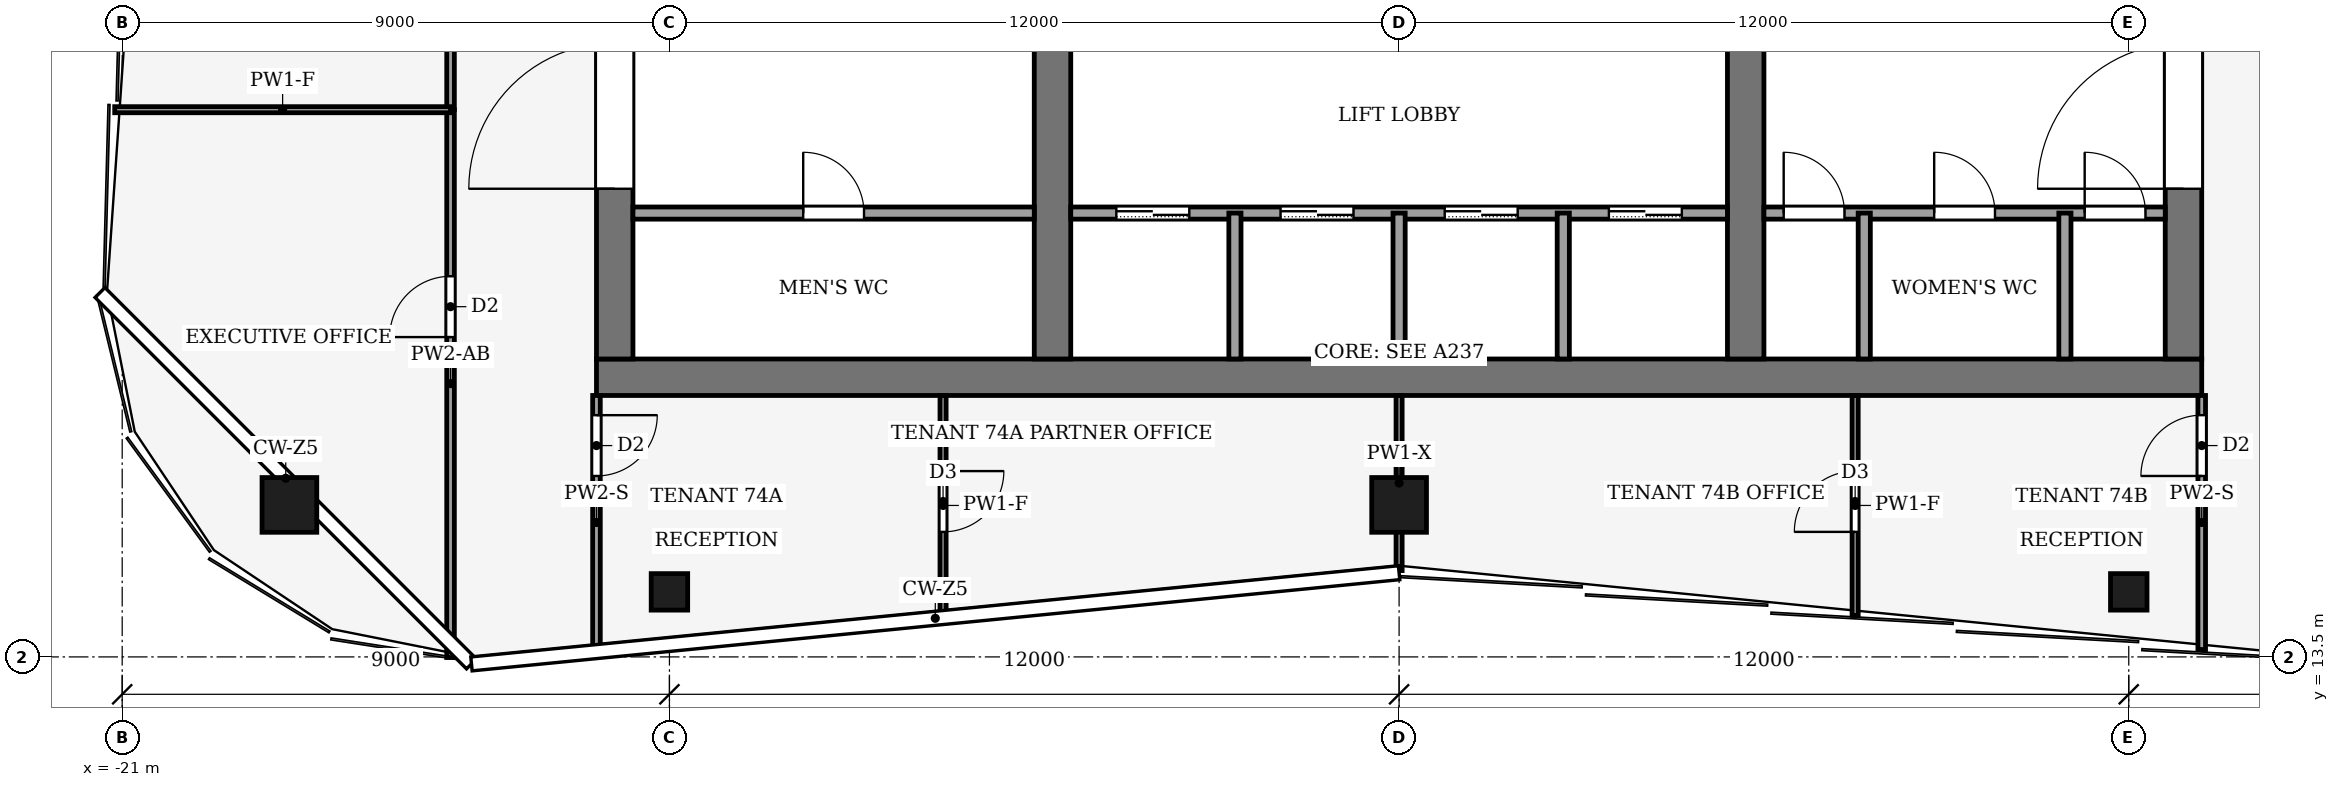
"""IFC4 building model, lengths in metres.
Left out: names, types, materials, properties, quantities, classifications, styles, units other than length and angle.
Written with IfcOpenShell. Run it as: python <this file> out.ifc"""

import sys

from ifc_helpers import new_model, si_unit, direction, frame, frame_2d, origin, origin_2d, place, context, subcontext, project, spatial, rectangle, hollow_rectangle, extrude, element, fill, save


model = new_model("IFC4")
c1 = context("Model", 3, precision=1e-05, world=origin(), true_north=direction((0.0, 1.0)))
c2 = subcontext(c1, "Body", "Model", "MODEL_VIEW")
j1 = project(units=[si_unit("LENGTHUNIT", "METRE"), si_unit("PLANEANGLEUNIT", "RADIAN")], contexts=[c1])
p1 = place(None, origin())
s1 = spatial("IfcSite", under=j1, at=p1, CompositionType="ELEMENT")
p2 = place(p1, origin())
s2 = spatial("IfcBuilding", under=s1, at=p2, CompositionType="ELEMENT")
p3 = place(p2, frame((0.0, 0.0, 322.0)))
s3 = spatial("IfcBuildingStorey", under=s2, at=p3, CompositionType="ELEMENT", Elevation=322.0)
p4 = place(p3, frame((-13.2, 18.1, -0.13), z_axis=(0.0, 0.0, 1.0), x_axis=(1.0, 0.0, 0.0)))
e1 = element("IfcWall", 1, at=p4, inside=s3, PredefinedType="SHEAR", context=c2, shape_type="SweptSolid", body=[
    extrude(rectangle(XDim=26.4, YDim=0.6, at=frame_2d((13.2, 0.0))), origin(), (0.0, 0.0, 1.0), 4.0),
])
p5 = place(p3, frame((-12.9, 18.4, -0.13), z_axis=(0.0, 0.0, 1.0), x_axis=(0.0, 1.0, 0.0)))
e2 = element("IfcWall", 2, at=p5, inside=s3, PredefinedType="SHEAR", context=c2, shape_type="SweptSolid", body=[
    extrude(rectangle(XDim=19.2, YDim=0.6, at=frame_2d((9.6, 0.0))), origin(), (0.0, 0.0, 1.0), 4.0),
])
p6 = place(p5, frame((2.8, 0.0, 0.13)))
e3 = element("IfcOpeningElement", 3, at=p6, cuts=e2, PredefinedType="OPENING", context=c2, shape_type="SweptSolid", body=[
    extrude(rectangle(XDim=2.4, YDim=2.4, at=frame_2d((1.2, 1.2))), frame((0.0, 0.31, 0.0), z_axis=(0.0, -1.0, 0.0), x_axis=(1.0, 0.0, 0.0)), (0.0, 0.0, 1.0), 0.62),
])
p7 = place(p5, frame((13.4, 0.0, 0.13)))
e4 = element("IfcOpeningElement", 4, at=p7, cuts=e2, PredefinedType="OPENING", context=c2, shape_type="SweptSolid", body=[
    extrude(rectangle(XDim=1.4, YDim=2.2, at=frame_2d((0.7, 1.1))), frame((0.0, 0.31, 0.0), z_axis=(0.0, -1.0, 0.0), x_axis=(1.0, 0.0, 0.0)), (0.0, 0.0, 1.0), 0.62),
])
p8 = place(p3, frame((12.9, 18.4, -0.13), z_axis=(0.0, 0.0, 1.0), x_axis=(0.0, 1.0, 0.0)))
e5 = element("IfcWall", 5, at=p8, inside=s3, PredefinedType="SHEAR", context=c2, shape_type="SweptSolid", body=[
    extrude(rectangle(XDim=19.2, YDim=0.6, at=frame_2d((9.6, 0.0))), origin(), (0.0, 0.0, 1.0), 4.0),
])
p9 = place(p8, frame((2.8, 0.0, 0.13)))
e6 = element("IfcOpeningElement", 6, at=p9, cuts=e5, PredefinedType="OPENING", context=c2, shape_type="SweptSolid", body=[
    extrude(rectangle(XDim=2.4, YDim=2.4, at=frame_2d((1.2, 1.2))), frame((0.0, 0.31, 0.0), z_axis=(0.0, -1.0, 0.0), x_axis=(1.0, 0.0, 0.0)), (0.0, 0.0, 1.0), 0.62),
])
p10 = place(p8, frame((13.3, 0.0, 0.13)))
e7 = element("IfcOpeningElement", 7, at=p10, cuts=e5, PredefinedType="OPENING", context=c2, shape_type="SweptSolid", body=[
    extrude(rectangle(XDim=2.4, YDim=2.4, at=frame_2d((1.2, 1.2))), frame((0.0, 0.31, 0.0), z_axis=(0.0, -1.0, 0.0), x_axis=(1.0, 0.0, 0.0)), (0.0, 0.0, 1.0), 0.62),
])
p11 = place(p3, frame((-5.7, 18.4, -0.13), z_axis=(0.0, 0.0, 1.0), x_axis=(0.0, 1.0, 0.0)))
e8 = element("IfcWall", 8, at=p11, inside=s3, PredefinedType="SHEAR", context=c2, shape_type="SweptSolid", body=[
    extrude(rectangle(XDim=19.2, YDim=0.6, at=frame_2d((9.6, 0.0))), origin(), (0.0, 0.0, 1.0), 4.0),
])
p12 = place(p11, frame((8.35, 0.0, 0.13)))
e9 = element("IfcOpeningElement", 9, at=p12, cuts=e8, PredefinedType="OPENING", context=c2, shape_type="SweptSolid", body=[
    extrude(rectangle(XDim=0.9, YDim=2.1, at=frame_2d((0.45, 1.05))), frame((0.0, 0.31, 0.0), z_axis=(0.0, -1.0, 0.0), x_axis=(1.0, 0.0, 0.0)), (0.0, 0.0, 1.0), 0.62),
])
p13 = place(p3, frame((5.7, 18.4, -0.13), z_axis=(0.0, 0.0, 1.0), x_axis=(0.0, 1.0, 0.0)))
e10 = element("IfcWall", 10, at=p13, inside=s3, PredefinedType="SHEAR", context=c2, shape_type="SweptSolid", body=[
    extrude(rectangle(XDim=19.2, YDim=0.6, at=frame_2d((9.6, 0.0))), origin(), (0.0, 0.0, 1.0), 4.0),
])
p14 = place(p13, frame((13.3, 0.0, 0.13)))
e11 = element("IfcOpeningElement", 11, at=p14, cuts=e10, PredefinedType="OPENING", context=c2, shape_type="SweptSolid", body=[
    extrude(rectangle(XDim=2.4, YDim=2.4, at=frame_2d((1.2, 1.2))), frame((0.0, 0.31, 0.0), z_axis=(0.0, -1.0, 0.0), x_axis=(1.0, 0.0, 0.0)), (0.0, 0.0, 1.0), 0.62),
])
for number, where, z_axis, x_axis in (
    (12, (0.0, 16.0, 0.0), (0.0, 0.0, 1.0), (1.0, 0.0, 0.0)),
    (13, (-18.25, 16.0, 0.0), (0.0, 0.0, 1.0), (1.0, 0.0, 0.0)),
):
    element("IfcColumn", number, at=place(p3, frame(where, z_axis=z_axis, x_axis=x_axis)), inside=s3, PredefinedType="COLUMN", context=c2, shape_type="SweptSolid", body=[
        extrude(hollow_rectangle(XDim=0.9, YDim=0.9, WallThickness=0.04, at=origin_2d()), origin(), (0.0, 0.0, 1.0), 4.0),
    ])
for number, where, z_axis, x_axis in (
    (14, (-12.0, 14.57, 0.0), (0.0, 0.0, 1.0), (1.0, 0.0, 0.0)),
    (15, (12.0, 14.57, 0.0), (0.0, 0.0, 1.0), (1.0, 0.0, 0.0)),
):
    element("IfcColumn", number, at=place(p3, frame(where, z_axis=z_axis, x_axis=x_axis)), inside=s3, PredefinedType="COLUMN", context=c2, shape_type="SweptSolid", body=[
        extrude(hollow_rectangle(XDim=0.6, YDim=0.6, WallThickness=0.025, at=origin_2d()), origin(), (0.0, 0.0, 1.0), 4.0),
    ])
p15 = place(p3, frame((-12.6, 20.8, 0.0), z_axis=(0.0, 0.0, 1.0), x_axis=(1.0, 0.0, 0.0)))
e16 = element("IfcWall", 16, at=p15, inside=s3, PredefinedType="PARTITIONING", context=c2, shape_type="SweptSolid", body=[
    extrude(rectangle(XDim=6.6, YDim=0.2, at=frame_2d((3.3, 0.0))), origin(), (0.0, 0.0, 1.0), 3.87),
])
p16 = place(p15, frame((2.8, 0.0, 0.0)))
e17 = element("IfcOpeningElement", 17, at=p16, cuts=e16, PredefinedType="OPENING", context=c2, shape_type="SweptSolid", body=[
    extrude(rectangle(XDim=1.0, YDim=2.1, at=frame_2d((0.5, 1.05))), frame((0.0, 0.11, 0.0), z_axis=(0.0, -1.0, 0.0), x_axis=(1.0, 0.0, 0.0)), (0.0, 0.0, 1.0), 0.22),
])
p17 = place(p3, frame((-5.4, 20.8, 0.0), z_axis=(0.0, 0.0, 1.0), x_axis=(1.0, 0.0, 0.0)))
e18 = element("IfcWall", 18, at=p17, inside=s3, PredefinedType="PARTITIONING", context=c2, shape_type="SweptSolid", body=[
    extrude(rectangle(XDim=10.8, YDim=0.2, at=frame_2d((5.4, 0.0))), origin(), (0.0, 0.0, 1.0), 3.87),
])
p18 = place(p17, frame((0.75, 0.0, 0.0)))
e19 = element("IfcOpeningElement", 19, at=p18, cuts=e18, PredefinedType="OPENING", context=c2, shape_type="SweptSolid", body=[
    extrude(rectangle(XDim=1.2, YDim=2.2, at=frame_2d((0.6, 1.1))), frame((0.0, 0.11, 0.0), z_axis=(0.0, -1.0, 0.0), x_axis=(1.0, 0.0, 0.0)), (0.0, 0.0, 1.0), 0.22),
])
p19 = place(p17, frame((3.45, 0.0, 0.0)))
e20 = element("IfcOpeningElement", 20, at=p19, cuts=e18, PredefinedType="OPENING", context=c2, shape_type="SweptSolid", body=[
    extrude(rectangle(XDim=1.2, YDim=2.2, at=frame_2d((0.6, 1.1))), frame((0.0, 0.11, 0.0), z_axis=(0.0, -1.0, 0.0), x_axis=(1.0, 0.0, 0.0)), (0.0, 0.0, 1.0), 0.22),
])
p20 = place(p17, frame((6.15, 0.0, 0.0)))
e21 = element("IfcOpeningElement", 21, at=p20, cuts=e18, PredefinedType="OPENING", context=c2, shape_type="SweptSolid", body=[
    extrude(rectangle(XDim=1.2, YDim=2.2, at=frame_2d((0.6, 1.1))), frame((0.0, 0.11, 0.0), z_axis=(0.0, -1.0, 0.0), x_axis=(1.0, 0.0, 0.0)), (0.0, 0.0, 1.0), 0.22),
])
p21 = place(p17, frame((8.85, 0.0, 0.0)))
e22 = element("IfcOpeningElement", 22, at=p21, cuts=e18, PredefinedType="OPENING", context=c2, shape_type="SweptSolid", body=[
    extrude(rectangle(XDim=1.2, YDim=2.2, at=frame_2d((0.6, 1.1))), frame((0.0, 0.11, 0.0), z_axis=(0.0, -1.0, 0.0), x_axis=(1.0, 0.0, 0.0)), (0.0, 0.0, 1.0), 0.22),
])
p22 = place(p3, frame((6.0, 20.8, 0.0), z_axis=(0.0, 0.0, 1.0), x_axis=(1.0, 0.0, 0.0)))
e23 = element("IfcWall", 23, at=p22, inside=s3, PredefinedType="PARTITIONING", context=c2, shape_type="SweptSolid", body=[
    extrude(rectangle(XDim=6.6, YDim=0.2, at=frame_2d((3.3, 0.0))), origin(), (0.0, 0.0, 1.0), 3.87),
])
p23 = place(p22, frame((0.325, 0.0, 0.0)))
e24 = element("IfcOpeningElement", 24, at=p23, cuts=e23, PredefinedType="OPENING", context=c2, shape_type="SweptSolid", body=[
    extrude(rectangle(XDim=1.0, YDim=2.1, at=frame_2d((0.5, 1.05))), frame((0.0, 0.11, 0.0), z_axis=(0.0, -1.0, 0.0), x_axis=(1.0, 0.0, 0.0)), (0.0, 0.0, 1.0), 0.22),
])
p24 = place(p22, frame((2.8, 0.0, 0.0)))
e25 = element("IfcOpeningElement", 25, at=p24, cuts=e23, PredefinedType="OPENING", context=c2, shape_type="SweptSolid", body=[
    extrude(rectangle(XDim=1.0, YDim=2.1, at=frame_2d((0.5, 1.05))), frame((0.0, 0.11, 0.0), z_axis=(0.0, -1.0, 0.0), x_axis=(1.0, 0.0, 0.0)), (0.0, 0.0, 1.0), 0.22),
])
p25 = place(p22, frame((5.275, 0.0, 0.0)))
e26 = element("IfcOpeningElement", 26, at=p25, cuts=e23, PredefinedType="OPENING", context=c2, shape_type="SweptSolid", body=[
    extrude(rectangle(XDim=1.0, YDim=2.1, at=frame_2d((0.5, 1.05))), frame((0.0, 0.11, 0.0), z_axis=(0.0, -1.0, 0.0), x_axis=(1.0, 0.0, 0.0)), (0.0, 0.0, 1.0), 0.22),
])
for number, where, z_axis, x_axis in (
    (27, (-2.7, 18.4, 0.0), (0.0, 0.0, 1.0), (0.0, 1.0, 0.0)),
    (28, (0.0, 18.4, 0.0), (0.0, 0.0, 1.0), (0.0, 1.0, 0.0)),
    (29, (2.7, 18.4, 0.0), (0.0, 0.0, 1.0), (0.0, 1.0, 0.0)),
    (30, (7.65, 18.4, 0.0), (0.0, 0.0, 1.0), (0.0, 1.0, 0.0)),
    (31, (10.95, 18.4, 0.0), (0.0, 0.0, 1.0), (0.0, 1.0, 0.0)),
):
    element("IfcWall", number, at=place(p3, frame(where, z_axis=z_axis, x_axis=x_axis)), inside=s3, PredefinedType="PARTITIONING", context=c2, shape_type="SweptSolid", body=[
        extrude(rectangle(XDim=2.4, YDim=0.2, at=frame_2d((1.2, 0.0))), origin(), (0.0, 0.0, 1.0), 3.87),
    ])
p26 = place(p3, frame((-15.6, 13.49, 0.0), z_axis=(0.0, 0.0, 1.0), x_axis=(0.0, 1.0, 0.0)))
e32 = element("IfcWall", 32, at=p26, inside=s3, PredefinedType="PARTITIONING", context=c2, shape_type="SweptSolid", body=[
    extrude(rectangle(XDim=9.01, YDim=0.125, at=frame_2d((4.505, 0.0))), origin(), (0.0, 0.0, 1.0), 2.93),
])
p27 = place(p26, frame((5.271, 0.0, 0.0)))
e33 = element("IfcOpeningElement", 33, at=p27, cuts=e32, PredefinedType="OPENING", context=c2, shape_type="SweptSolid", body=[
    extrude(rectangle(XDim=1.0, YDim=2.1, at=frame_2d((0.5, 1.05))), frame((0.0, 0.073, 0.0), z_axis=(0.0, -1.0, 0.0), x_axis=(1.0, 0.0, 0.0)), (0.0, 0.0, 1.0), 0.145),
])
p28 = place(p3, frame((-15.6, 22.5, 0.0), z_axis=(0.0, 0.0, 1.0), x_axis=(0.0, 1.0, 0.0)))
e34 = element("IfcWall", 34, at=p28, inside=s3, PredefinedType="PARTITIONING", context=c2, shape_type="SweptSolid", body=[
    extrude(rectangle(XDim=3.0, YDim=0.125, at=frame_2d((1.5, 0.0))), origin(), (0.0, 0.0, 1.0), 3.54),
])
p29 = place(p28, frame((1.05, 0.0, 0.0)))
e35 = element("IfcOpeningElement", 35, at=p29, cuts=e34, PredefinedType="OPENING", context=c2, shape_type="SweptSolid", body=[
    extrude(rectangle(XDim=0.9, YDim=2.1, at=frame_2d((0.45, 1.05))), frame((0.0, 0.073, 0.0), z_axis=(0.0, -1.0, 0.0), x_axis=(1.0, 0.0, 0.0)), (0.0, 0.0, 1.0), 0.145),
])
p30 = place(p3, frame((-13.2, 17.8, 0.0), z_axis=(0.0, 0.0, 1.0), x_axis=(0.0, -1.0, 0.0)))
e36 = element("IfcWall", 36, at=p30, inside=s3, PredefinedType="PARTITIONING", context=c2, shape_type="SweptSolid", body=[
    extrude(rectangle(XDim=4.178, YDim=0.125, at=frame_2d((2.089, 0.0))), origin(), (0.0, 0.0, 1.0), 3.04),
])
p31 = place(p30, frame((0.324, 0.0, 0.0)))
e37 = element("IfcOpeningElement", 37, at=p31, cuts=e36, PredefinedType="OPENING", context=c2, shape_type="SweptSolid", body=[
    extrude(rectangle(XDim=1.0, YDim=2.1, at=frame_2d((0.5, 1.05))), frame((0.0, 0.073, 0.0), z_axis=(0.0, -1.0, 0.0), x_axis=(1.0, 0.0, 0.0)), (0.0, 0.0, 1.0), 0.145),
])
p32 = place(p3, frame((13.2, 13.622, 0.0), z_axis=(0.0, 0.0, 1.0), x_axis=(0.0, 1.0, 0.0)))
e38 = element("IfcWall", 38, at=p32, inside=s3, PredefinedType="PARTITIONING", context=c2, shape_type="SweptSolid", body=[
    extrude(rectangle(XDim=4.178, YDim=0.125, at=frame_2d((2.089, 0.0))), origin(), (0.0, 0.0, 1.0), 3.04),
])
p33 = place(p32, frame((2.854, 0.0, 0.0)))
e39 = element("IfcOpeningElement", 39, at=p33, cuts=e38, PredefinedType="OPENING", context=c2, shape_type="SweptSolid", body=[
    extrude(rectangle(XDim=1.0, YDim=2.1, at=frame_2d((0.5, 1.05))), frame((0.0, 0.073, 0.0), z_axis=(0.0, -1.0, 0.0), x_axis=(1.0, 0.0, 0.0)), (0.0, 0.0, 1.0), 0.145),
])
p34 = place(p3, frame((-15.6, 22.5, 0.0), z_axis=(0.0, 0.0, 1.0), x_axis=(-1.0, 0.0, 0.0)))
e40 = element("IfcWall", 40, at=p34, inside=s3, PredefinedType="PARTITIONING", context=c2, shape_type="SweptSolid", body=[
    extrude(rectangle(XDim=5.523, YDim=0.1, at=frame_2d((2.761, 0.0))), origin(), (0.0, 0.0, 1.0), 3.04),
])
p35 = place(p3, frame((-7.5, 17.8, 0.0), z_axis=(0.0, 0.0, 1.0), x_axis=(0.0, -1.0, 0.0)))
e41 = element("IfcWall", 41, at=p35, inside=s3, PredefinedType="PARTITIONING", context=c2, shape_type="SweptSolid", body=[
    extrude(rectangle(XDim=3.618, YDim=0.1, at=frame_2d((1.809, 0.0))), origin(), (0.0, 0.0, 1.0), 3.04),
])
p36 = place(p35, frame((1.244, 0.0, 0.0)))
e42 = element("IfcOpeningElement", 42, at=p36, cuts=e41, PredefinedType="OPENING", context=c2, shape_type="SweptSolid", body=[
    extrude(rectangle(XDim=1.0, YDim=2.1, at=frame_2d((0.5, 1.05))), frame((0.0, 0.06, 0.0), z_axis=(0.0, -1.0, 0.0), x_axis=(1.0, 0.0, 0.0)), (0.0, 0.0, 1.0), 0.12),
])
p37 = place(p3, frame((0.0, 14.92, 0.0), z_axis=(0.0, 0.0, 1.0), x_axis=(0.0, 1.0, 0.0)))
e43 = element("IfcWall", 43, at=p37, inside=s3, PredefinedType="PARTITIONING", context=c2, shape_type="SweptSolid", body=[
    extrude(rectangle(XDim=2.88, YDim=0.1, at=frame_2d((1.44, 0.0))), origin(), (0.0, 0.0, 1.0), 3.54),
])
p38 = place(p3, frame((7.5, 14.182, 0.0), z_axis=(0.0, 0.0, 1.0), x_axis=(0.0, 1.0, 0.0)))
e44 = element("IfcWall", 44, at=p38, inside=s3, PredefinedType="PARTITIONING", context=c2, shape_type="SweptSolid", body=[
    extrude(rectangle(XDim=3.618, YDim=0.1, at=frame_2d((1.809, 0.0))), origin(), (0.0, 0.0, 1.0), 3.04),
])
p39 = place(p38, frame((1.374, 0.0, 0.0)))
e45 = element("IfcOpeningElement", 45, at=p39, cuts=e44, PredefinedType="OPENING", context=c2, shape_type="SweptSolid", body=[
    extrude(rectangle(XDim=1.0, YDim=2.1, at=frame_2d((0.5, 1.05))), frame((0.0, 0.06, 0.0), z_axis=(0.0, -1.0, 0.0), x_axis=(1.0, 0.0, 0.0)), (0.0, 0.0, 1.0), 0.12),
])
p40 = place(p18, origin())
e46 = element("IfcDoor", 46, at=p40, inside=s3, OperationType="SLIDING_TO_LEFT", PredefinedType="DOOR", context=c2, shape_type="SweptSolid", body=[
    extrude(rectangle(XDim=1.2, YDim=2.2, at=frame_2d((0.6, 1.1))), frame((0.0, 0.025, 0.0), z_axis=(0.0, -1.0, 0.0), x_axis=(1.0, 0.0, 0.0)), (0.0, 0.0, 1.0), 0.05),
])
fill(e19, e46)
p41 = place(p19, origin())
e47 = element("IfcDoor", 47, at=p41, inside=s3, OperationType="SLIDING_TO_LEFT", PredefinedType="DOOR", context=c2, shape_type="SweptSolid", body=[
    extrude(rectangle(XDim=1.2, YDim=2.2, at=frame_2d((0.6, 1.1))), frame((0.0, 0.025, 0.0), z_axis=(0.0, -1.0, 0.0), x_axis=(1.0, 0.0, 0.0)), (0.0, 0.0, 1.0), 0.05),
])
fill(e20, e47)
p42 = place(p20, origin())
e48 = element("IfcDoor", 48, at=p42, inside=s3, OperationType="SLIDING_TO_LEFT", PredefinedType="DOOR", context=c2, shape_type="SweptSolid", body=[
    extrude(rectangle(XDim=1.2, YDim=2.2, at=frame_2d((0.6, 1.1))), frame((0.0, 0.025, 0.0), z_axis=(0.0, -1.0, 0.0), x_axis=(1.0, 0.0, 0.0)), (0.0, 0.0, 1.0), 0.05),
])
fill(e21, e48)
p43 = place(p21, origin())
e49 = element("IfcDoor", 49, at=p43, inside=s3, OperationType="SLIDING_TO_LEFT", PredefinedType="DOOR", context=c2, shape_type="SweptSolid", body=[
    extrude(rectangle(XDim=1.2, YDim=2.2, at=frame_2d((0.6, 1.1))), frame((0.0, 0.025, 0.0), z_axis=(0.0, -1.0, 0.0), x_axis=(1.0, 0.0, 0.0)), (0.0, 0.0, 1.0), 0.05),
])
fill(e22, e49)
p44 = place(p16, origin())
e50 = element("IfcDoor", 50, at=p44, inside=s3, OperationType="SINGLE_SWING_LEFT", PredefinedType="DOOR", context=c2, shape_type="SweptSolid", body=[
    extrude(rectangle(XDim=1.0, YDim=2.1, at=frame_2d((0.5, 1.05))), frame((0.0, 0.025, 0.0), z_axis=(0.0, -1.0, 0.0), x_axis=(1.0, 0.0, 0.0)), (0.0, 0.0, 1.0), 0.05),
])
fill(e17, e50)
p45 = place(p23, origin())
e51 = element("IfcDoor", 51, at=p45, inside=s3, OperationType="SINGLE_SWING_LEFT", PredefinedType="DOOR", context=c2, shape_type="SweptSolid", body=[
    extrude(rectangle(XDim=1.0, YDim=2.1, at=frame_2d((0.5, 1.05))), frame((0.0, 0.025, 0.0), z_axis=(0.0, -1.0, 0.0), x_axis=(1.0, 0.0, 0.0)), (0.0, 0.0, 1.0), 0.05),
])
fill(e24, e51)
p46 = place(p24, origin())
e52 = element("IfcDoor", 52, at=p46, inside=s3, OperationType="SINGLE_SWING_LEFT", PredefinedType="DOOR", context=c2, shape_type="SweptSolid", body=[
    extrude(rectangle(XDim=1.0, YDim=2.1, at=frame_2d((0.5, 1.05))), frame((0.0, 0.025, 0.0), z_axis=(0.0, -1.0, 0.0), x_axis=(1.0, 0.0, 0.0)), (0.0, 0.0, 1.0), 0.05),
])
fill(e25, e52)
p47 = place(p25, origin())
e53 = element("IfcDoor", 53, at=p47, inside=s3, OperationType="SINGLE_SWING_LEFT", PredefinedType="DOOR", context=c2, shape_type="SweptSolid", body=[
    extrude(rectangle(XDim=1.0, YDim=2.1, at=frame_2d((0.5, 1.05))), frame((0.0, 0.025, 0.0), z_axis=(0.0, -1.0, 0.0), x_axis=(1.0, 0.0, 0.0)), (0.0, 0.0, 1.0), 0.05),
])
fill(e26, e53)
p48 = place(p6, origin())
e54 = element("IfcDoor", 54, at=p48, inside=s3, OperationType="DOUBLE_DOOR_SINGLE_SWING", PredefinedType="DOOR", context=c2, shape_type="SweptSolid", body=[
    extrude(rectangle(XDim=2.4, YDim=2.4, at=frame_2d((1.2, 1.2))), frame((0.0, 0.025, 0.0), z_axis=(0.0, -1.0, 0.0), x_axis=(1.0, 0.0, 0.0)), (0.0, 0.0, 1.0), 0.05),
])
fill(e3, e54)
p49 = place(p9, origin())
e55 = element("IfcDoor", 55, at=p49, inside=s3, OperationType="DOUBLE_DOOR_SINGLE_SWING", PredefinedType="DOOR", context=c2, shape_type="SweptSolid", body=[
    extrude(rectangle(XDim=2.4, YDim=2.4, at=frame_2d((1.2, 1.2))), frame((0.0, 0.025, 0.0), z_axis=(0.0, -1.0, 0.0), x_axis=(1.0, 0.0, 0.0)), (0.0, 0.0, 1.0), 0.05),
])
fill(e6, e55)
p50 = place(p27, origin())
e56 = element("IfcDoor", 56, at=p50, inside=s3, OperationType="SINGLE_SWING_RIGHT", PredefinedType="DOOR", context=c2, shape_type="SweptSolid", body=[
    extrude(rectangle(XDim=1.0, YDim=2.1, at=frame_2d((0.5, 1.05))), frame((0.0, 0.025, 0.0), z_axis=(0.0, -1.0, 0.0), x_axis=(1.0, 0.0, 0.0)), (0.0, 0.0, 1.0), 0.05),
])
fill(e33, e56)
p51 = place(p31, origin())
e57 = element("IfcDoor", 57, at=p51, inside=s3, OperationType="SINGLE_SWING_LEFT", PredefinedType="DOOR", context=c2, shape_type="SweptSolid", body=[
    extrude(rectangle(XDim=1.0, YDim=2.1, at=frame_2d((0.5, 1.05))), frame((0.0, 0.025, 0.0), z_axis=(0.0, -1.0, 0.0), x_axis=(1.0, 0.0, 0.0)), (0.0, 0.0, 1.0), 0.05),
])
fill(e37, e57)
p52 = place(p33, origin())
e58 = element("IfcDoor", 58, at=p52, inside=s3, OperationType="SINGLE_SWING_RIGHT", PredefinedType="DOOR", context=c2, shape_type="SweptSolid", body=[
    extrude(rectangle(XDim=1.0, YDim=2.1, at=frame_2d((0.5, 1.05))), frame((0.0, 0.025, 0.0), z_axis=(0.0, -1.0, 0.0), x_axis=(1.0, 0.0, 0.0)), (0.0, 0.0, 1.0), 0.05),
])
fill(e39, e58)
p53 = place(p36, origin())
e59 = element("IfcDoor", 59, at=p53, inside=s3, OperationType="SINGLE_SWING_LEFT", PredefinedType="DOOR", context=c2, shape_type="SweptSolid", body=[
    extrude(rectangle(XDim=1.0, YDim=2.1, at=frame_2d((0.5, 1.05))), frame((0.0, 0.025, 0.0), z_axis=(0.0, -1.0, 0.0), x_axis=(1.0, 0.0, 0.0)), (0.0, 0.0, 1.0), 0.05),
])
fill(e42, e59)
p54 = place(p39, origin())
e60 = element("IfcDoor", 60, at=p54, inside=s3, OperationType="SINGLE_SWING_RIGHT", PredefinedType="DOOR", context=c2, shape_type="SweptSolid", body=[
    extrude(rectangle(XDim=1.0, YDim=2.1, at=frame_2d((0.5, 1.05))), frame((0.0, 0.025, 0.0), z_axis=(0.0, -1.0, 0.0), x_axis=(1.0, 0.0, 0.0)), (0.0, 0.0, 1.0), 0.05),
])
fill(e45, e60)
save(model, sys.argv[1])
